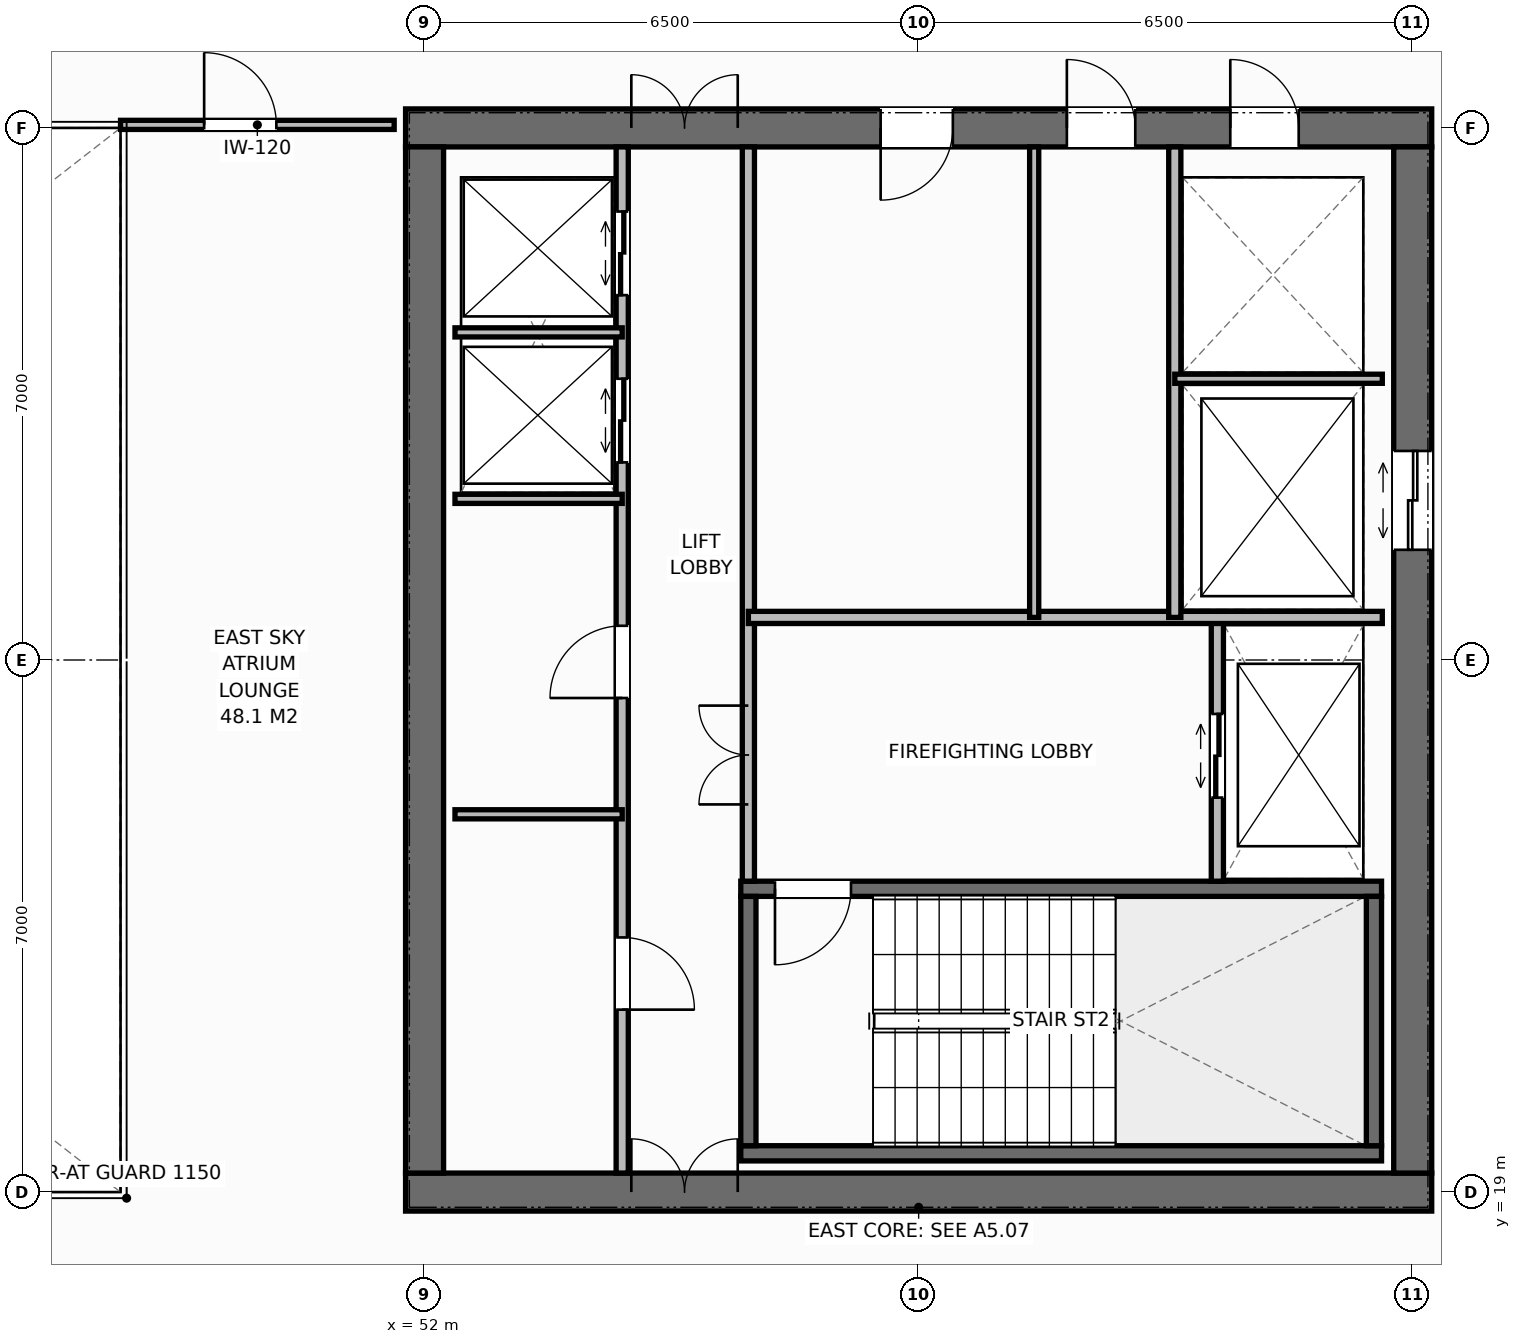
"""IFC4 building model, lengths in metres.
Left out: names, types, materials, properties, quantities, classifications, styles, units other than length and angle.
Written with IfcOpenShell. Run it as: python <this file> out.ifc"""

import sys

from ifc_helpers import new_model, si_unit, direction, frame, frame_2d, origin, place, context, subcontext, project, spatial, rectangle, extrude, element, fill, save


model = new_model("IFC4")
c1 = context("Model", 3, precision=1e-05, world=origin(), true_north=direction((0.0, 1.0)))
c2 = subcontext(c1, "Body", "Model", "MODEL_VIEW")
j1 = project(units=[si_unit("LENGTHUNIT", "METRE"), si_unit("PLANEANGLEUNIT", "RADIAN")], contexts=[c1])
p1 = place(None, origin())
s1 = spatial("IfcSite", under=j1, at=p1, CompositionType="ELEMENT")
p2 = place(p1, origin())
s2 = spatial("IfcBuilding", under=s1, at=p2, CompositionType="ELEMENT")
p3 = place(p2, frame((0.0, 0.0, 298.4)))
s3 = spatial("IfcBuildingStorey", under=s2, at=p3, CompositionType="ELEMENT", Elevation=298.4)
p4 = place(p3, frame((51.75, 19.0, 0.0), z_axis=(0.0, 0.0, 1.0), x_axis=(1.0, 0.0, 0.0)))
e1 = element("IfcWall", 1, at=p4, inside=s3, PredefinedType="SHEAR", context=c2, shape_type="SweptSolid", body=[
    extrude(rectangle(XDim=13.5, YDim=0.5, at=frame_2d((6.75, 0.0))), origin(), (0.0, 0.0, 1.0), 4.0),
])
p5 = place(p4, frame((2.97, 0.0, 0.0)))
e2 = element("IfcOpeningElement", 2, at=p5, cuts=e1, PredefinedType="OPENING", context=c2, shape_type="SweptSolid", body=[
    extrude(rectangle(XDim=1.4, YDim=2.2, at=frame_2d((0.7, 1.1))), frame((0.0, 0.26, 0.0), z_axis=(0.0, -1.0, 0.0), x_axis=(1.0, 0.0, 0.0)), (0.0, 0.0, 1.0), 0.52),
])
p6 = place(p3, frame((51.75, 33.0, 0.0), z_axis=(0.0, 0.0, 1.0), x_axis=(1.0, 0.0, 0.0)))
e3 = element("IfcWall", 3, at=p6, inside=s3, PredefinedType="SHEAR", context=c2, shape_type="SweptSolid", body=[
    extrude(rectangle(XDim=13.5, YDim=0.5, at=frame_2d((6.75, 0.0))), origin(), (0.0, 0.0, 1.0), 4.0),
])
p7 = place(p6, frame((2.97, 0.0, 0.0)))
e4 = element("IfcOpeningElement", 4, at=p7, cuts=e3, PredefinedType="OPENING", context=c2, shape_type="SweptSolid", body=[
    extrude(rectangle(XDim=1.4, YDim=2.2, at=frame_2d((0.7, 1.1))), frame((0.0, 0.26, 0.0), z_axis=(0.0, -1.0, 0.0), x_axis=(1.0, 0.0, 0.0)), (0.0, 0.0, 1.0), 0.52),
])
p8 = place(p6, frame((10.85, 0.0, 0.0)))
e5 = element("IfcOpeningElement", 5, at=p8, cuts=e3, PredefinedType="OPENING", context=c2, shape_type="SweptSolid", body=[
    extrude(rectangle(XDim=0.9, YDim=2.15, at=frame_2d((0.45, 1.075))), frame((0.0, 0.26, 0.0), z_axis=(0.0, -1.0, 0.0), x_axis=(1.0, 0.0, 0.0)), (0.0, 0.0, 1.0), 0.52),
])
p9 = place(p6, frame((6.25, 0.0, 0.0)))
e6 = element("IfcOpeningElement", 6, at=p9, cuts=e3, PredefinedType="OPENING", context=c2, shape_type="SweptSolid", body=[
    extrude(rectangle(XDim=0.95, YDim=2.15, at=frame_2d((0.475, 1.075))), frame((0.0, 0.26, 0.0), z_axis=(0.0, -1.0, 0.0), x_axis=(1.0, 0.0, 0.0)), (0.0, 0.0, 1.0), 0.52),
])
p10 = place(p6, frame((8.7, 0.0, 0.0)))
e7 = element("IfcOpeningElement", 7, at=p10, cuts=e3, PredefinedType="OPENING", context=c2, shape_type="SweptSolid", body=[
    extrude(rectangle(XDim=0.9, YDim=2.15, at=frame_2d((0.45, 1.075))), frame((0.0, 0.26, 0.0), z_axis=(0.0, -1.0, 0.0), x_axis=(1.0, 0.0, 0.0)), (0.0, 0.0, 1.0), 0.52),
])
p11 = place(p3, frame((52.0, 19.25, 0.0), z_axis=(0.0, 0.0, 1.0), x_axis=(0.0, 1.0, 0.0)))
e8 = element("IfcWall", 8, at=p11, inside=s3, PredefinedType="SHEAR", context=c2, shape_type="SweptSolid", body=[
    extrude(rectangle(XDim=13.5, YDim=0.5, at=frame_2d((6.75, 0.0))), origin(), (0.0, 0.0, 1.0), 4.0),
])
p12 = place(p3, frame((65.0, 19.25, 0.0), z_axis=(0.0, 0.0, 1.0), x_axis=(0.0, 1.0, 0.0)))
e9 = element("IfcWall", 9, at=p12, inside=s3, PredefinedType="SHEAR", context=c2, shape_type="SweptSolid", body=[
    extrude(rectangle(XDim=13.5, YDim=0.5, at=frame_2d((6.75, 0.0))), origin(), (0.0, 0.0, 1.0), 4.0),
])
p13 = place(p12, frame((8.2, 0.0, 0.0)))
e10 = element("IfcOpeningElement", 10, at=p13, cuts=e9, PredefinedType="OPENING", context=c2, shape_type="SweptSolid", body=[
    extrude(rectangle(XDim=1.3, YDim=2.2, at=frame_2d((0.65, 1.1))), frame((0.0, 0.26, 0.0), z_axis=(0.0, -1.0, 0.0), x_axis=(1.0, 0.0, 0.0)), (0.0, 0.0, 1.0), 0.52),
])
p14 = place(p3, frame((56.16, 19.51, 0.0), z_axis=(0.0, 0.0, 1.0), x_axis=(1.0, 0.0, 0.0)))
e11 = element("IfcWall", 11, at=p14, inside=s3, PredefinedType="SHEAR", context=c2, shape_type="SweptSolid", body=[
    extrude(rectangle(XDim=8.43, YDim=0.2, at=frame_2d((4.215, 0.0))), origin(), (0.0, 0.0, 1.0), 4.0),
])
p15 = place(p3, frame((56.16, 22.99, 0.0), z_axis=(0.0, 0.0, 1.0), x_axis=(1.0, 0.0, 0.0)))
e12 = element("IfcWall", 12, at=p15, inside=s3, PredefinedType="SHEAR", context=c2, shape_type="SweptSolid", body=[
    extrude(rectangle(XDim=8.43, YDim=0.2, at=frame_2d((4.215, 0.0))), origin(), (0.0, 0.0, 1.0), 4.0),
])
p16 = place(p15, frame((0.45, 0.0, 0.0)))
e13 = element("IfcOpeningElement", 13, at=p16, cuts=e12, PredefinedType="OPENING", context=c2, shape_type="SweptSolid", body=[
    extrude(rectangle(XDim=1.0, YDim=2.15, at=frame_2d((0.5, 1.075))), frame((0.0, 0.11, 0.0), z_axis=(0.0, -1.0, 0.0), x_axis=(1.0, 0.0, 0.0)), (0.0, 0.0, 1.0), 0.22),
])
for number, where, z_axis, x_axis in (
    (14, (56.26, 19.61, 0.0), (0.0, 0.0, 1.0), (0.0, 1.0, 0.0)),
    (15, (64.49, 19.61, 0.0), (0.0, 0.0, 1.0), (0.0, 1.0, 0.0)),
):
    element("IfcWall", number, at=place(p3, frame(where, z_axis=z_axis, x_axis=x_axis)), inside=s3, PredefinedType="SHEAR", context=c2, shape_type="SweptSolid", body=[
        extrude(rectangle(XDim=3.28, YDim=0.2, at=frame_2d((1.64, 0.0))), origin(), (0.0, 0.0, 1.0), 4.0),
    ])
p17 = place(p3, frame((54.6, 19.25, 0.0), z_axis=(0.0, 0.0, 1.0), x_axis=(0.0, 1.0, 0.0)))
e16 = element("IfcWall", 16, at=p17, inside=s3, PredefinedType="STANDARD", context=c2, shape_type="SweptSolid", body=[
    extrude(rectangle(XDim=13.5, YDim=0.16, at=frame_2d((6.75, 0.0))), origin(), (0.0, 0.0, 1.0), 3.788),
])
p18 = place(p17, frame((2.15, 0.0, 0.0)))
e17 = element("IfcOpeningElement", 17, at=p18, cuts=e16, PredefinedType="OPENING", context=c2, shape_type="SweptSolid", body=[
    extrude(rectangle(XDim=0.95, YDim=2.15, at=frame_2d((0.475, 1.075))), frame((0.0, 0.09, 0.0), z_axis=(0.0, -1.0, 0.0), x_axis=(1.0, 0.0, 0.0)), (0.0, 0.0, 1.0), 0.18),
])
p19 = place(p17, frame((6.25, 0.0, 0.0)))
e18 = element("IfcOpeningElement", 18, at=p19, cuts=e16, PredefinedType="OPENING", context=c2, shape_type="SweptSolid", body=[
    extrude(rectangle(XDim=0.95, YDim=2.15, at=frame_2d((0.475, 1.075))), frame((0.0, 0.09, 0.0), z_axis=(0.0, -1.0, 0.0), x_axis=(1.0, 0.0, 0.0)), (0.0, 0.0, 1.0), 0.18),
])
p20 = place(p17, frame((9.35, 0.0, 0.0)))
e19 = element("IfcOpeningElement", 19, at=p20, cuts=e16, PredefinedType="OPENING", context=c2, shape_type="SweptSolid", body=[
    extrude(rectangle(XDim=1.1, YDim=2.2, at=frame_2d((0.55, 1.1))), frame((0.0, 0.09, 0.0), z_axis=(0.0, -1.0, 0.0), x_axis=(1.0, 0.0, 0.0)), (0.0, 0.0, 1.0), 0.18),
])
p21 = place(p17, frame((11.55, 0.0, 0.0)))
e20 = element("IfcOpeningElement", 20, at=p21, cuts=e16, PredefinedType="OPENING", context=c2, shape_type="SweptSolid", body=[
    extrude(rectangle(XDim=1.1, YDim=2.2, at=frame_2d((0.55, 1.1))), frame((0.0, 0.09, 0.0), z_axis=(0.0, -1.0, 0.0), x_axis=(1.0, 0.0, 0.0)), (0.0, 0.0, 1.0), 0.18),
])
p22 = place(p3, frame((56.26, 23.09, 0.0), z_axis=(0.0, 0.0, 1.0), x_axis=(0.0, 1.0, 0.0)))
e21 = element("IfcWall", 21, at=p22, inside=s3, PredefinedType="STANDARD", context=c2, shape_type="SweptSolid", body=[
    extrude(rectangle(XDim=9.66, YDim=0.16, at=frame_2d((4.83, 0.0))), origin(), (0.0, 0.0, 1.0), 3.788),
])
p23 = place(p22, frame((1.01, 0.0, 0.0)))
e22 = element("IfcOpeningElement", 22, at=p23, cuts=e21, PredefinedType="OPENING", context=c2, shape_type="SweptSolid", body=[
    extrude(rectangle(XDim=1.3, YDim=2.2, at=frame_2d((0.65, 1.1))), frame((0.0, 0.09, 0.0), z_axis=(0.0, -1.0, 0.0), x_axis=(1.0, 0.0, 0.0)), (0.0, 0.0, 1.0), 0.18),
])
for number, where, z_axis, x_axis in (
    (23, (52.4, 23.97, 0.0), (0.0, 0.0, 1.0), (1.0, 0.0, 0.0)),
    (24, (52.4, 28.12, 0.0), (0.0, 0.0, 1.0), (1.0, 0.0, 0.0)),
    (25, (52.4, 30.31, 0.0), (0.0, 0.0, 1.0), (1.0, 0.0, 0.0)),
):
    element("IfcWall", number, at=place(p3, frame(where, z_axis=z_axis, x_axis=x_axis)), inside=s3, PredefinedType="PARTITIONING", context=c2, shape_type="SweptSolid", body=[
        extrude(rectangle(XDim=2.2, YDim=0.12, at=frame_2d((1.1, 0.0))), origin(), (0.0, 0.0, 1.0), 3.788),
    ])
p24 = place(p3, frame((62.43, 23.09, 0.0), z_axis=(0.0, 0.0, 1.0), x_axis=(0.0, 1.0, 0.0)))
e26 = element("IfcWall", 26, at=p24, inside=s3, PredefinedType="STANDARD", context=c2, shape_type="SweptSolid", body=[
    extrude(rectangle(XDim=3.47, YDim=0.16, at=frame_2d((1.735, 0.0))), origin(), (0.0, 0.0, 1.0), 3.788),
])
p25 = place(p24, frame((1.1, 0.0, 0.0)))
e27 = element("IfcOpeningElement", 27, at=p25, cuts=e26, PredefinedType="OPENING", context=c2, shape_type="SweptSolid", body=[
    extrude(rectangle(XDim=1.1, YDim=2.2, at=frame_2d((0.55, 1.1))), frame((0.0, 0.09, 0.0), z_axis=(0.0, -1.0, 0.0), x_axis=(1.0, 0.0, 0.0)), (0.0, 0.0, 1.0), 0.18),
])
p26 = place(p3, frame((56.26, 26.56, 0.0), z_axis=(0.0, 0.0, 1.0), x_axis=(1.0, 0.0, 0.0)))
e28 = element("IfcWall", 28, at=p26, inside=s3, PredefinedType="STANDARD", context=c2, shape_type="SweptSolid", body=[
    extrude(rectangle(XDim=8.34, YDim=0.16, at=frame_2d((4.17, 0.0))), origin(), (0.0, 0.0, 1.0), 3.788),
])
p27 = place(p3, frame((61.87, 26.56, 0.0), z_axis=(0.0, 0.0, 1.0), x_axis=(0.0, 1.0, 0.0)))
e29 = element("IfcWall", 29, at=p27, inside=s3, PredefinedType="STANDARD", context=c2, shape_type="SweptSolid", body=[
    extrude(rectangle(XDim=6.19, YDim=0.16, at=frame_2d((3.095, 0.0))), origin(), (0.0, 0.0, 1.0), 3.788),
])
p28 = place(p3, frame((61.87, 29.7, 0.0), z_axis=(0.0, 0.0, 1.0), x_axis=(1.0, 0.0, 0.0)))
e30 = element("IfcWall", 30, at=p28, inside=s3, PredefinedType="PARTITIONING", context=c2, shape_type="SweptSolid", body=[
    extrude(rectangle(XDim=2.73, YDim=0.12, at=frame_2d((1.365, 0.0))), origin(), (0.0, 0.0, 1.0), 3.788),
])
p29 = place(p3, frame((60.02, 26.56, 0.0), z_axis=(0.0, 0.0, 1.0), x_axis=(0.0, 1.0, 0.0)))
e31 = element("IfcWall", 31, at=p29, inside=s3, PredefinedType="PARTITIONING", context=c2, shape_type="SweptSolid", body=[
    extrude(rectangle(XDim=6.19, YDim=0.12, at=frame_2d((3.095, 0.0))), origin(), (0.0, 0.0, 1.0), 3.788),
])
p30 = place(p3, frame((48.0, 33.04, 0.0), z_axis=(0.0, 0.0, 1.0), x_axis=(1.0, 0.0, 0.0)))
e32 = element("IfcWall", 32, at=p30, inside=s3, PredefinedType="PARTITIONING", context=c2, shape_type="SweptSolid", body=[
    extrude(rectangle(XDim=3.6, YDim=0.12, at=frame_2d((1.8, 0.0))), origin(), (0.0, 0.0, 1.0), 3.528),
])
p31 = place(p30, frame((1.1, 0.0, 0.0)))
e33 = element("IfcOpeningElement", 33, at=p31, cuts=e32, PredefinedType="OPENING", context=c2, shape_type="SweptSolid", body=[
    extrude(rectangle(XDim=0.95, YDim=2.15, at=frame_2d((0.475, 1.075))), frame((0.0, 0.07, 0.0), z_axis=(0.0, -1.0, 0.0), x_axis=(1.0, 0.0, 0.0)), (0.0, 0.0, 1.0), 0.14),
])
p32 = place(p5, origin())
e34 = element("IfcDoor", 34, at=p32, inside=s3, OperationType="DOUBLE_DOOR_SINGLE_SWING", PredefinedType="DOOR", context=c2, shape_type="SweptSolid", body=[
    extrude(rectangle(XDim=1.4, YDim=2.2, at=frame_2d((0.7, 1.1))), frame((0.0, 0.075, 0.0), z_axis=(0.0, -1.0, 0.0), x_axis=(1.0, 0.0, 0.0)), (0.0, 0.0, 1.0), 0.05),
])
fill(e2, e34)
p33 = place(p7, origin())
e35 = element("IfcDoor", 35, at=p33, inside=s3, OperationType="DOUBLE_DOOR_SINGLE_SWING", PredefinedType="DOOR", context=c2, shape_type="SweptSolid", body=[
    extrude(rectangle(XDim=1.4, YDim=2.2, at=frame_2d((0.7, 1.1))), frame((0.0, -0.025, 0.0), z_axis=(0.0, -1.0, 0.0), x_axis=(1.0, 0.0, 0.0)), (0.0, 0.0, 1.0), 0.05),
])
fill(e4, e35)
p34 = place(p18, origin())
e36 = element("IfcDoor", 36, at=p34, inside=s3, OperationType="SINGLE_SWING_RIGHT", PredefinedType="DOOR", context=c2, shape_type="SweptSolid", body=[
    extrude(rectangle(XDim=0.95, YDim=2.15, at=frame_2d((0.475, 1.075))), frame((0.0, 0.025, 0.0), z_axis=(0.0, -1.0, 0.0), x_axis=(1.0, 0.0, 0.0)), (0.0, 0.0, 1.0), 0.05),
])
fill(e17, e36)
p35 = place(p19, origin())
e37 = element("IfcDoor", 37, at=p35, inside=s3, OperationType="SINGLE_SWING_LEFT", PredefinedType="DOOR", context=c2, shape_type="SweptSolid", body=[
    extrude(rectangle(XDim=0.95, YDim=2.15, at=frame_2d((0.475, 1.075))), frame((0.0, 0.025, 0.0), z_axis=(0.0, -1.0, 0.0), x_axis=(1.0, 0.0, 0.0)), (0.0, 0.0, 1.0), 0.05),
])
fill(e18, e37)
p36 = place(p20, origin())
e38 = element("IfcDoor", 38, at=p36, inside=s3, OperationType="DOUBLE_DOOR_SLIDING", PredefinedType="DOOR", context=c2, shape_type="SweptSolid", body=[
    extrude(rectangle(XDim=1.1, YDim=2.2, at=frame_2d((0.55, 1.1))), frame((0.0, 0.025, 0.0), z_axis=(0.0, -1.0, 0.0), x_axis=(1.0, 0.0, 0.0)), (0.0, 0.0, 1.0), 0.05),
])
fill(e19, e38)
p37 = place(p21, origin())
e39 = element("IfcDoor", 39, at=p37, inside=s3, OperationType="DOUBLE_DOOR_SLIDING", PredefinedType="DOOR", context=c2, shape_type="SweptSolid", body=[
    extrude(rectangle(XDim=1.1, YDim=2.2, at=frame_2d((0.55, 1.1))), frame((0.0, 0.025, 0.0), z_axis=(0.0, -1.0, 0.0), x_axis=(1.0, 0.0, 0.0)), (0.0, 0.0, 1.0), 0.05),
])
fill(e20, e39)
p38 = place(p16, origin())
e40 = element("IfcDoor", 40, at=p38, inside=s3, OperationType="SINGLE_SWING_RIGHT", PredefinedType="DOOR", context=c2, shape_type="SweptSolid", body=[
    extrude(rectangle(XDim=1.0, YDim=2.15, at=frame_2d((0.5, 1.075))), frame((0.0, 0.025, 0.0), z_axis=(0.0, -1.0, 0.0), x_axis=(1.0, 0.0, 0.0)), (0.0, 0.0, 1.0), 0.05),
])
fill(e13, e40)
p39 = place(p25, origin())
e41 = element("IfcDoor", 41, at=p39, inside=s3, OperationType="DOUBLE_DOOR_SLIDING", PredefinedType="DOOR", context=c2, shape_type="SweptSolid", body=[
    extrude(rectangle(XDim=1.1, YDim=2.2, at=frame_2d((0.55, 1.1))), frame((0.0, 0.025, 0.0), z_axis=(0.0, -1.0, 0.0), x_axis=(1.0, 0.0, 0.0)), (0.0, 0.0, 1.0), 0.05),
])
fill(e27, e41)
p40 = place(p23, origin())
e42 = element("IfcDoor", 42, at=p40, inside=s3, OperationType="DOUBLE_DOOR_SINGLE_SWING", PredefinedType="DOOR", context=c2, shape_type="SweptSolid", body=[
    extrude(rectangle(XDim=1.3, YDim=2.2, at=frame_2d((0.65, 1.1))), frame((0.0, 0.025, 0.0), z_axis=(0.0, -1.0, 0.0), x_axis=(1.0, 0.0, 0.0)), (0.0, 0.0, 1.0), 0.05),
])
fill(e22, e42)
p41 = place(p13, origin())
e43 = element("IfcDoor", 43, at=p41, inside=s3, OperationType="DOUBLE_DOOR_SLIDING", PredefinedType="DOOR", context=c2, shape_type="SweptSolid", body=[
    extrude(rectangle(XDim=1.3, YDim=2.2, at=frame_2d((0.65, 1.1))), frame((0.0, 0.025, 0.0), z_axis=(0.0, -1.0, 0.0), x_axis=(1.0, 0.0, 0.0)), (0.0, 0.0, 1.0), 0.05),
])
fill(e10, e43)
p42 = place(p8, origin())
e44 = element("IfcDoor", 44, at=p42, inside=s3, OperationType="SINGLE_SWING_LEFT", PredefinedType="DOOR", context=c2, shape_type="SweptSolid", body=[
    extrude(rectangle(XDim=0.9, YDim=2.15, at=frame_2d((0.45, 1.075))), frame((0.0, -0.025, 0.0), z_axis=(0.0, -1.0, 0.0), x_axis=(1.0, 0.0, 0.0)), (0.0, 0.0, 1.0), 0.05),
])
fill(e5, e44)
p43 = place(p9, origin())
e45 = element("IfcDoor", 45, at=p43, inside=s3, OperationType="SINGLE_SWING_RIGHT", PredefinedType="DOOR", context=c2, shape_type="SweptSolid", body=[
    extrude(rectangle(XDim=0.95, YDim=2.15, at=frame_2d((0.475, 1.075))), frame((0.0, -0.025, 0.0), z_axis=(0.0, -1.0, 0.0), x_axis=(1.0, 0.0, 0.0)), (0.0, 0.0, 1.0), 0.05),
])
fill(e6, e45)
p44 = place(p10, origin())
e46 = element("IfcDoor", 46, at=p44, inside=s3, OperationType="SINGLE_SWING_LEFT", PredefinedType="DOOR", context=c2, shape_type="SweptSolid", body=[
    extrude(rectangle(XDim=0.9, YDim=2.15, at=frame_2d((0.45, 1.075))), frame((0.0, -0.025, 0.0), z_axis=(0.0, -1.0, 0.0), x_axis=(1.0, 0.0, 0.0)), (0.0, 0.0, 1.0), 0.05),
])
fill(e7, e46)
p45 = place(p31, origin())
e47 = element("IfcDoor", 47, at=p45, inside=s3, OperationType="SINGLE_SWING_LEFT", PredefinedType="DOOR", context=c2, shape_type="SweptSolid", body=[
    extrude(rectangle(XDim=0.95, YDim=2.15, at=frame_2d((0.475, 1.075))), frame((0.0, 0.025, 0.0), z_axis=(0.0, -1.0, 0.0), x_axis=(1.0, 0.0, 0.0)), (0.0, 0.0, 1.0), 0.05),
])
fill(e33, e47)
save(model, sys.argv[1])
